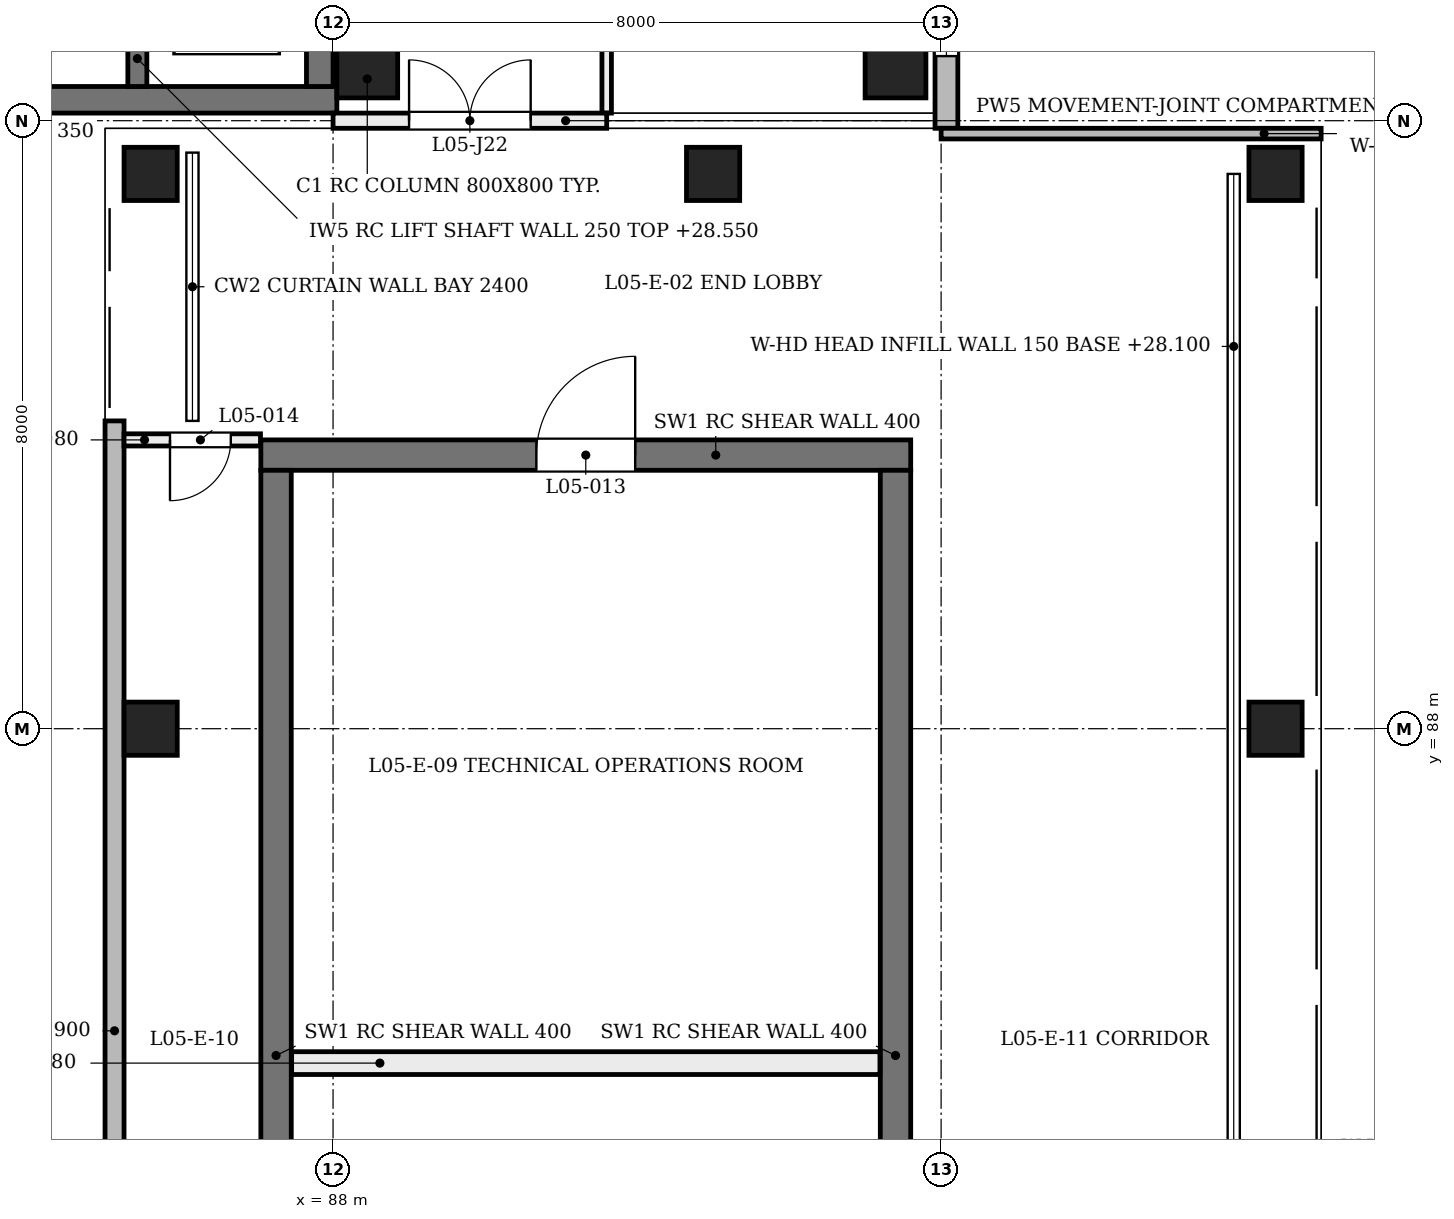
"""IFC4 building model, lengths in metres.
Left out: names, types, materials, properties, quantities, classifications, styles, units other than length and angle.
Written with IfcOpenShell. Run it as: python <this file> out.ifc"""

import sys

from ifc_helpers import new_model, si_unit, direction, frame, frame_2d, origin, origin_2d, place, context, subcontext, project, spatial, rectangle, extrude, element, fill, save


model = new_model("IFC4")
c1 = context("Model", 3, precision=1e-05, world=origin(), true_north=direction((0.0, 1.0)))
c2 = subcontext(c1, "Body", "Model", "MODEL_VIEW")
j1 = project(units=[si_unit("LENGTHUNIT", "METRE"), si_unit("PLANEANGLEUNIT", "RADIAN")], contexts=[c1])
p1 = place(None, origin())
s1 = spatial("IfcSite", under=j1, at=p1, CompositionType="ELEMENT")
p2 = place(p1, origin())
s2 = spatial("IfcBuilding", under=s1, at=p2, CompositionType="ELEMENT")
p3 = place(p2, frame((0.0, 0.0, 24.0)))
s3 = spatial("IfcBuildingStorey", under=s2, at=p3, CompositionType="ELEMENT", Elevation=24.0)
p4 = place(p3, frame((87.05, 91.6, 0.0), z_axis=(0.0, 0.0, 1.0), x_axis=(1.0, 0.0, 0.0)))
e1 = element("IfcWall", 1, at=p4, inside=s3, PredefinedType="SHEAR", context=c2, shape_type="SweptSolid", body=[
    extrude(rectangle(XDim=8.55, YDim=0.4, at=frame_2d((4.275, 0.0))), origin(), (0.0, 0.0, 1.0), 4.58),
])
p5 = place(p4, frame((3.625, 0.0, 0.0)))
e2 = element("IfcOpeningElement", 2, at=p5, cuts=e1, PredefinedType="OPENING", context=c2, shape_type="SweptSolid", body=[
    extrude(rectangle(XDim=1.3, YDim=2.2, at=frame_2d((0.65, 1.1))), frame((0.0, 0.21, 0.0), z_axis=(0.0, -1.0, 0.0), x_axis=(1.0, 0.0, 0.0)), (0.0, 0.0, 1.0), 0.42),
])
p6 = place(p3, frame((87.25, 75.8, 0.0), z_axis=(0.0, 0.0, 1.0), x_axis=(0.0, 1.0, 0.0)))
e3 = element("IfcWall", 3, at=p6, inside=s3, PredefinedType="SHEAR", context=c2, shape_type="SweptSolid", body=[
    extrude(rectangle(XDim=15.6, YDim=0.4, at=frame_2d((7.8, 0.0))), origin(), (0.0, 0.0, 1.0), 4.58),
])
p7 = place(p3, frame((95.4, 75.8, 0.0), z_axis=(0.0, 0.0, 1.0), x_axis=(0.0, 1.0, 0.0)))
e4 = element("IfcWall", 4, at=p7, inside=s3, PredefinedType="SHEAR", context=c2, shape_type="SweptSolid", body=[
    extrude(rectangle(XDim=15.6, YDim=0.4, at=frame_2d((7.8, 0.0))), origin(), (0.0, 0.0, 1.0), 4.58),
])
p8 = place(p7, frame((3.223, 0.0, 0.0)))
e5 = element("IfcOpeningElement", 5, at=p8, cuts=e4, PredefinedType="OPENING", context=c2, shape_type="SweptSolid", body=[
    extrude(rectangle(XDim=1.3, YDim=2.2, at=frame_2d((0.65, 1.1))), frame((0.0, 0.21, 0.0), z_axis=(0.0, -1.0, 0.0), x_axis=(1.0, 0.0, 0.0)), (0.0, 0.0, 1.0), 0.42),
])
p9 = place(p3, frame((80.1, 96.275, 0.0), z_axis=(0.0, 0.0, 1.0), x_axis=(1.0, 0.0, 0.0)))
e6 = element("IfcWall", 6, at=p9, inside=s3, PredefinedType="SHEAR", context=c2, shape_type="SweptSolid", body=[
    extrude(rectangle(XDim=7.95, YDim=0.35, at=frame_2d((3.975, 0.0))), origin(), (0.0, 0.0, 1.0), 4.58),
])
p10 = place(p3, frame((87.825, 96.45, 0.0), z_axis=(0.0, 0.0, 1.0), x_axis=(0.0, 1.0, 0.0)))
e7 = element("IfcWall", 7, at=p10, inside=s3, PredefinedType="SHEAR", context=c2, shape_type="SweptSolid", body=[
    extrude(rectangle(XDim=15.2, YDim=0.35, at=frame_2d((7.6, 0.0))), origin(), (0.0, 0.0, 1.0), 4.58),
])
p11 = place(p10, frame((13.25, 0.0, 0.0)))
e8 = element("IfcOpeningElement", 8, at=p11, cuts=e7, PredefinedType="OPENING", context=c2, shape_type="SweptSolid", body=[
    extrude(rectangle(XDim=1.0, YDim=2.1, at=frame_2d((0.5, 1.05))), frame((0.0, 0.185, 0.0), z_axis=(0.0, -1.0, 0.0), x_axis=(1.0, 0.0, 0.0)), (0.0, 0.0, 1.0), 0.37),
])
p12 = place(p10, frame((3.2, 0.0, 0.0)))
e9 = element("IfcOpeningElement", 9, at=p12, cuts=e7, PredefinedType="OPENING", context=c2, shape_type="SweptSolid", body=[
    extrude(rectangle(XDim=1.4, YDim=2.1, at=frame_2d((0.7, 1.05))), frame((0.0, 0.185, 0.0), z_axis=(0.0, -1.0, 0.0), x_axis=(1.0, 0.0, 0.0)), (0.0, 0.0, 1.0), 0.37),
])
for number, where, z_axis, x_axis in (
    (10, (88.45, 96.7, 0.0), (0.0, 0.0, 1.0), (1.0, 0.0, 0.0)),
    (11, (95.4, 96.7, 0.0), (0.0, 0.0, 1.0), (1.0, 0.0, 0.0)),
):
    element("IfcColumn", number, at=place(p3, frame(where, z_axis=z_axis, x_axis=x_axis)), inside=s3, PredefinedType="COLUMN", context=c2, shape_type="SweptSolid", body=[
        extrude(rectangle(XDim=0.8, YDim=0.8, at=origin_2d()), origin(), (0.0, 0.0, 1.0), 4.58),
    ])
for number, where, z_axis, x_axis in (
    (12, (85.6, 88.0, 0.0), (0.0, 0.0, 1.0), (1.0, 0.0, 0.0)),
    (13, (85.6, 95.3, 0.0), (0.0, 0.0, 1.0), (1.0, 0.0, 0.0)),
    (14, (93.0, 95.3, 0.0), (0.0, 0.0, 1.0), (1.0, 0.0, 0.0)),
    (15, (100.4, 88.0, 0.0), (0.0, 0.0, 1.0), (1.0, 0.0, 0.0)),
    (16, (100.4, 95.3, 0.0), (0.0, 0.0, 1.0), (1.0, 0.0, 0.0)),
):
    element("IfcColumn", number, at=place(p3, frame(where, z_axis=z_axis, x_axis=x_axis)), inside=s3, PredefinedType="COLUMN", context=c2, shape_type="SweptSolid", body=[
        extrude(rectangle(XDim=0.7, YDim=0.7, at=origin_2d()), origin(), (0.0, 0.0, 1.0), 4.58),
    ])
p13 = place(p3, frame((99.85, 80.2, 4.1), z_axis=(0.0, 0.0, 1.0), x_axis=(0.0, 1.0, 0.0)))
e17 = element("IfcWall", 17, at=p13, inside=s3, PredefinedType="SOLIDWALL", context=c2, shape_type="SweptSolid", body=[
    extrude(rectangle(XDim=7.6, YDim=0.15, at=frame_2d((3.8, 0.0))), origin(), (0.0, 0.0, 1.0), 0.48),
])
p14 = place(p3, frame((99.85, 88.2, 4.1), z_axis=(0.0, 0.0, 1.0), x_axis=(0.0, 1.0, 0.0)))
e18 = element("IfcWall", 18, at=p14, inside=s3, PredefinedType="SOLIDWALL", context=c2, shape_type="SweptSolid", body=[
    extrude(rectangle(XDim=6.9, YDim=0.15, at=frame_2d((3.45, 0.0))), origin(), (0.0, 0.0, 1.0), 0.48),
])
p15 = place(p3, frame((85.125, 67.95, 0.0), z_axis=(0.0, 0.0, 1.0), x_axis=(0.0, 1.0, 0.0)))
e19 = element("IfcWall", 19, at=p15, inside=s3, PredefinedType="SOLIDWALL", context=c2, shape_type="SweptSolid", body=[
    extrude(rectangle(XDim=24.1, YDim=0.25, at=frame_2d((12.05, 0.0))), origin(), (0.0, 0.0, 1.0), 3.9),
])
p16 = place(p3, frame((96.07, 95.9, 0.0), z_axis=(0.0, 0.0, 1.0), x_axis=(0.0, 1.0, 0.0)))
e20 = element("IfcWall", 20, at=p16, inside=s3, PredefinedType="SOLIDWALL", context=c2, shape_type="SweptSolid", body=[
    extrude(rectangle(XDim=16.4, YDim=0.3, at=frame_2d((8.2, 0.0))), origin(), (0.0, 0.0, 1.0), 3.9),
])
p17 = place(p16, frame((0.95, 0.0, 1.0)))
e21 = element("IfcOpeningElement", 21, at=p17, cuts=e20, PredefinedType="OPENING", context=c2, shape_type="SweptSolid", body=[
    extrude(rectangle(XDim=1.2, YDim=2.4, at=frame_2d((0.6, 1.2))), frame((0.0, 0.16, 0.0), z_axis=(0.0, -1.0, 0.0), x_axis=(1.0, 0.0, 0.0)), (0.0, 0.0, 1.0), 0.32),
])
p18 = place(p16, frame((3.65, 0.0, 1.0)))
e22 = element("IfcOpeningElement", 22, at=p18, cuts=e20, PredefinedType="OPENING", context=c2, shape_type="SweptSolid", body=[
    extrude(rectangle(XDim=1.2, YDim=2.4, at=frame_2d((0.6, 1.2))), frame((0.0, 0.16, 0.0), z_axis=(0.0, -1.0, 0.0), x_axis=(1.0, 0.0, 0.0)), (0.0, 0.0, 1.0), 0.32),
])
p19 = place(p16, frame((6.35, 0.0, 1.0)))
e23 = element("IfcOpeningElement", 23, at=p19, cuts=e20, PredefinedType="OPENING", context=c2, shape_type="SweptSolid", body=[
    extrude(rectangle(XDim=1.2, YDim=2.4, at=frame_2d((0.6, 1.2))), frame((0.0, 0.16, 0.0), z_axis=(0.0, -1.0, 0.0), x_axis=(1.0, 0.0, 0.0)), (0.0, 0.0, 1.0), 0.32),
])
p20 = place(p16, frame((9.05, 0.0, 1.0)))
e24 = element("IfcOpeningElement", 24, at=p20, cuts=e20, PredefinedType="OPENING", context=c2, shape_type="SweptSolid", body=[
    extrude(rectangle(XDim=1.2, YDim=2.4, at=frame_2d((0.6, 1.2))), frame((0.0, 0.16, 0.0), z_axis=(0.0, -1.0, 0.0), x_axis=(1.0, 0.0, 0.0)), (0.0, 0.0, 1.0), 0.32),
])
p21 = place(p16, frame((11.75, 0.0, 1.0)))
e25 = element("IfcOpeningElement", 25, at=p21, cuts=e20, PredefinedType="OPENING", context=c2, shape_type="SweptSolid", body=[
    extrude(rectangle(XDim=1.2, YDim=2.4, at=frame_2d((0.6, 1.2))), frame((0.0, 0.16, 0.0), z_axis=(0.0, -1.0, 0.0), x_axis=(1.0, 0.0, 0.0)), (0.0, 0.0, 1.0), 0.32),
])
p22 = place(p16, frame((14.45, 0.0, 1.0)))
e26 = element("IfcOpeningElement", 26, at=p22, cuts=e20, PredefinedType="OPENING", context=c2, shape_type="SweptSolid", body=[
    extrude(rectangle(XDim=1.2, YDim=2.4, at=frame_2d((0.6, 1.2))), frame((0.0, 0.16, 0.0), z_axis=(0.0, -1.0, 0.0), x_axis=(1.0, 0.0, 0.0)), (0.0, 0.0, 1.0), 0.32),
])
p23 = place(p3, frame((96.0, 95.83, 0.0), z_axis=(0.0, 0.0, 1.0), x_axis=(1.0, 0.0, 0.0)))
e27 = element("IfcWall", 27, at=p23, inside=s3, PredefinedType="SOLIDWALL", context=c2, shape_type="SweptSolid", body=[
    extrude(rectangle(XDim=5.0, YDim=0.14, at=frame_2d((2.5, 0.0))), origin(), (0.0, 0.0, 1.0), 3.9),
])
p24 = place(p3, frame((85.425, 98.9, 0.0), z_axis=(0.0, 0.0, 1.0), x_axis=(0.0, -1.0, 0.0)))
e28 = element("IfcWall", 28, at=p24, inside=s3, PredefinedType="SOLIDWALL", context=c2, shape_type="SweptSolid", body=[
    extrude(rectangle(XDim=2.45, YDim=0.25, at=frame_2d((1.225, 0.0))), origin(), (0.0, 0.0, 1.0), 4.55),
])
p25 = place(p3, frame((85.25, 91.8, 0.0), z_axis=(0.0, 0.0, 1.0), x_axis=(1.0, 0.0, 0.0)))
e29 = element("IfcWall", 29, at=p25, inside=s3, PredefinedType="PARTITIONING", context=c2, shape_type="SweptSolid", body=[
    extrude(rectangle(XDim=1.795, YDim=0.16, at=frame_2d((0.897, 0.0))), origin(), (0.0, 0.0, 1.0), 4.08),
])
p26 = place(p25, frame((0.604, 0.0, 0.0)))
e30 = element("IfcOpeningElement", 30, at=p26, cuts=e29, PredefinedType="OPENING", context=c2, shape_type="SweptSolid", body=[
    extrude(rectangle(XDim=0.8, YDim=2.1, at=frame_2d((0.4, 1.05))), frame((0.0, 0.09, 0.0), z_axis=(0.0, -1.0, 0.0), x_axis=(1.0, 0.0, 0.0)), (0.0, 0.0, 1.0), 0.18),
])
p27 = place(p3, frame((87.455, 83.6, 0.0), z_axis=(0.0, 0.0, 1.0), x_axis=(1.0, 0.0, 0.0)))
e31 = element("IfcWall", 31, at=p27, inside=s3, PredefinedType="PARTITIONING", context=c2, shape_type="SweptSolid", body=[
    extrude(rectangle(XDim=7.74, YDim=0.3, at=frame_2d((3.87, 0.0))), origin(), (0.0, 0.0, 1.0), 4.08),
])
p28 = place(p3, frame((91.6, 96.1, 0.0), z_axis=(0.0, 0.0, 1.0), x_axis=(0.0, 1.0, 0.0)))
e32 = element("IfcWall", 32, at=p28, inside=s3, PredefinedType="PARTITIONING", context=c2, shape_type="SweptSolid", body=[
    extrude(rectangle(XDim=9.914, YDim=0.125, at=frame_2d((4.957, 0.0))), origin(), (0.0, 0.0, 1.0), 3.88),
])
p29 = place(p28, frame((6.983, 0.0, 0.0)))
e33 = element("IfcOpeningElement", 33, at=p29, cuts=e32, PredefinedType="OPENING", context=c2, shape_type="SweptSolid", body=[
    extrude(rectangle(XDim=1.0, YDim=2.1, at=frame_2d((0.5, 1.05))), frame((0.0, 0.073, 0.0), z_axis=(0.0, -1.0, 0.0), x_axis=(1.0, 0.0, 0.0)), (0.0, 0.0, 1.0), 0.145),
])
p30 = place(p28, frame((1.994, 0.0, 0.0)))
e34 = element("IfcOpeningElement", 34, at=p30, cuts=e32, PredefinedType="OPENING", context=c2, shape_type="SweptSolid", body=[
    extrude(rectangle(XDim=1.0, YDim=2.1, at=frame_2d((0.5, 1.05))), frame((0.0, 0.073, 0.0), z_axis=(0.0, -1.0, 0.0), x_axis=(1.0, 0.0, 0.0)), (0.0, 0.0, 1.0), 0.145),
])
p31 = place(p3, frame((88.0, 96.0, 0.0), z_axis=(0.0, 0.0, 1.0), x_axis=(1.0, 0.0, 0.0)))
e35 = element("IfcWall", 35, at=p31, inside=s3, PredefinedType="PARTITIONING", context=c2, shape_type="SweptSolid", body=[
    extrude(rectangle(XDim=3.6, YDim=0.2, at=frame_2d((1.8, 0.0))), origin(), (0.0, 0.0, 1.0), 3.88),
])
p32 = place(p31, frame((1.0, 0.0, 0.0)))
e36 = element("IfcOpeningElement", 36, at=p32, cuts=e35, PredefinedType="OPENING", context=c2, shape_type="SweptSolid", body=[
    extrude(rectangle(XDim=1.6, YDim=2.1, at=frame_2d((0.8, 1.05))), frame((0.0, 0.11, 0.0), z_axis=(0.0, -1.0, 0.0), x_axis=(1.0, 0.0, 0.0)), (0.0, 0.0, 1.0), 0.22),
])
p33 = place(p17, origin())
e37 = element("IfcWindow", 37, at=p33, inside=s3, PartitioningType="SINGLE_PANEL", PredefinedType="WINDOW", context=c2, shape_type="SweptSolid", body=[
    extrude(rectangle(XDim=1.2, YDim=2.4, at=frame_2d((0.6, 1.2))), frame((0.0, 0.03, 0.0), z_axis=(0.0, -1.0, 0.0), x_axis=(1.0, 0.0, 0.0)), (0.0, 0.0, 1.0), 0.06),
])
fill(e21, e37)
p34 = place(p5, frame((1.3, 0.0, 0.0), z_axis=(0.0, 0.0, 1.0), x_axis=(-1.0, 0.0, 0.0)))
e38 = element("IfcDoor", 38, at=p34, inside=s3, OperationType="SINGLE_SWING_RIGHT", PredefinedType="DOOR", context=c2, shape_type="SweptSolid", body=[
    extrude(rectangle(XDim=1.3, YDim=2.2, at=frame_2d((0.65, 1.1))), frame((0.0, 0.025, 0.0), z_axis=(0.0, -1.0, 0.0), x_axis=(1.0, 0.0, 0.0)), (0.0, 0.0, 1.0), 0.05),
])
fill(e2, e38)
p35 = place(p26, frame((0.8, 0.0, 0.0), z_axis=(0.0, 0.0, 1.0), x_axis=(-1.0, 0.0, 0.0)))
e39 = element("IfcDoor", 39, at=p35, inside=s3, OperationType="SINGLE_SWING_LEFT", PredefinedType="DOOR", context=c2, shape_type="SweptSolid", body=[
    extrude(rectangle(XDim=0.8, YDim=2.1, at=frame_2d((0.4, 1.05))), frame((0.0, 0.025, 0.0), z_axis=(0.0, -1.0, 0.0), x_axis=(1.0, 0.0, 0.0)), (0.0, 0.0, 1.0), 0.05),
])
fill(e30, e39)
p36 = place(p32, origin())
e40 = element("IfcDoor", 40, at=p36, inside=s3, OperationType="DOUBLE_DOOR_SINGLE_SWING", PredefinedType="DOOR", context=c2, shape_type="SweptSolid", body=[
    extrude(rectangle(XDim=1.6, YDim=2.1, at=frame_2d((0.8, 1.05))), frame((0.0, 0.025, 0.0), z_axis=(0.0, -1.0, 0.0), x_axis=(1.0, 0.0, 0.0)), (0.0, 0.0, 1.0), 0.05),
])
fill(e36, e40)
save(model, sys.argv[1])
